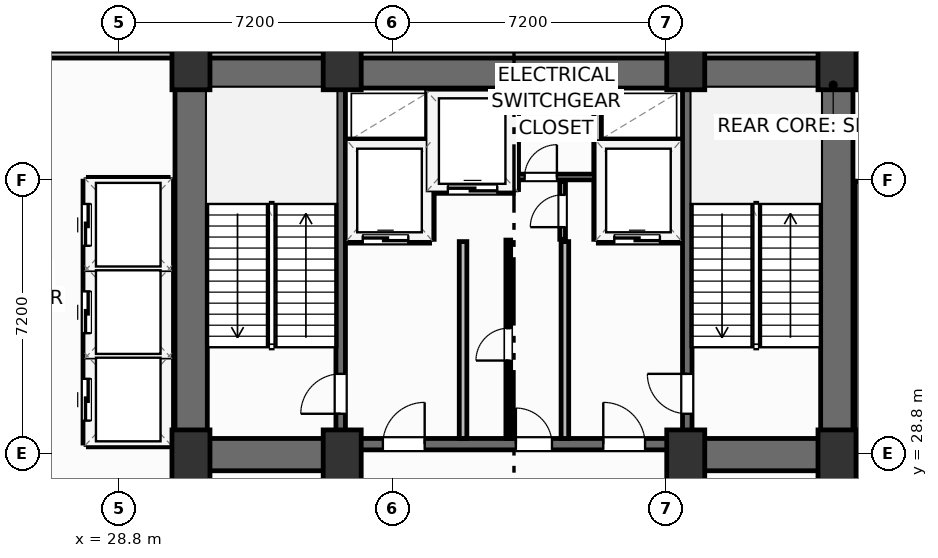
"""IFC4 building model, lengths in metres.
Left out: names, types, materials, properties, quantities, classifications, styles, units other than length and angle.
Written with IfcOpenShell. Run it as: python <this file> out.ifc"""

import sys

from ifc_helpers import new_model, si_unit, direction, frame, frame_2d, origin, origin_2d, place, context, subcontext, project, spatial, rectangle, extrude, element, fill, save


model = new_model("IFC4")
c1 = context("Model", 3, precision=1e-05, world=origin(), true_north=direction((0.0, 1.0)))
c2 = subcontext(c1, "Body", "Model", "MODEL_VIEW")
j1 = project(units=[si_unit("LENGTHUNIT", "METRE"), si_unit("PLANEANGLEUNIT", "RADIAN")], contexts=[c1])
p1 = place(None, origin())
s1 = spatial("IfcSite", under=j1, at=p1, CompositionType="ELEMENT")
p2 = place(p1, origin())
s2 = spatial("IfcBuilding", under=s1, at=p2, CompositionType="ELEMENT")
p3 = place(p2, frame((0.0, 0.0, 71.4)))
s3 = spatial("IfcBuildingStorey", under=s2, at=p3, CompositionType="ELEMENT", Elevation=71.4)
for number, where, z_axis, x_axis in (
    (1, (30.7, 28.75, 0.0), (0.0, 0.0, 1.0), (1.0, 0.0, 0.0)),
    (2, (34.68, 28.75, 0.0), (0.0, 0.0, 1.0), (1.0, 0.0, 0.0)),
    (3, (43.72, 28.75, 0.0), (0.0, 0.0, 1.0), (1.0, 0.0, 0.0)),
    (4, (47.7, 28.75, 0.0), (0.0, 0.0, 1.0), (1.0, 0.0, 0.0)),
    (5, (30.7, 39.05, 0.0), (0.0, 0.0, 1.0), (1.0, 0.0, 0.0)),
    (6, (34.68, 39.05, 0.0), (0.0, 0.0, 1.0), (1.0, 0.0, 0.0)),
    (7, (43.72, 39.05, 0.0), (0.0, 0.0, 1.0), (1.0, 0.0, 0.0)),
    (8, (47.7, 39.05, 0.0), (0.0, 0.0, 1.0), (1.0, 0.0, 0.0)),
):
    element("IfcColumn", number, at=place(p3, frame(where, z_axis=z_axis, x_axis=x_axis)), inside=s3, PredefinedType="COLUMN", context=c2, shape_type="SweptSolid", body=[
        extrude(rectangle(XDim=1.0, YDim=1.35, at=origin_2d()), origin(), (0.0, 0.0, 1.0), 4.8),
    ])
p4 = place(p3, frame((30.28, 38.845, 0.0), z_axis=(0.0, 0.0, 1.0), x_axis=(1.0, 0.0, 0.0)))
e9 = element("IfcWall", 9, at=p4, inside=s3, PredefinedType="SHEAR", context=c2, shape_type="SweptSolid", body=[
    extrude(rectangle(XDim=17.84, YDim=0.85, at=frame_2d((8.92, 0.0))), origin(), (0.0, 0.0, 1.0), 4.55),
])
for number, where, z_axis, x_axis in (
    (10, (30.705, 29.2, 0.0), (0.0, 0.0, 1.0), (0.0, 1.0, 0.0)),
    (11, (47.695, 29.2, 0.0), (0.0, 0.0, 1.0), (0.0, 1.0, 0.0)),
):
    element("IfcWall", number, at=place(p3, frame(where, z_axis=z_axis, x_axis=x_axis)), inside=s3, PredefinedType="SHEAR", context=c2, shape_type="SweptSolid", body=[
        extrude(rectangle(XDim=9.22, YDim=0.85, at=frame_2d((4.61, 0.0))), origin(), (0.0, 0.0, 1.0), 4.55),
    ])
for number, where, z_axis, x_axis in (
    (12, (30.28, 28.775, 0.0), (0.0, 0.0, 1.0), (1.0, 0.0, 0.0)),
    (13, (43.6, 28.775, 0.0), (0.0, 0.0, 1.0), (1.0, 0.0, 0.0)),
):
    element("IfcWall", number, at=place(p3, frame(where, z_axis=z_axis, x_axis=x_axis)), inside=s3, PredefinedType="SHEAR", context=c2, shape_type="SweptSolid", body=[
        extrude(rectangle(XDim=4.52, YDim=0.85, at=frame_2d((2.26, 0.0))), origin(), (0.0, 0.0, 1.0), 4.55),
    ])
p5 = place(p3, frame((34.8, 29.05, 0.0), z_axis=(0.0, 0.0, 1.0), x_axis=(1.0, 0.0, 0.0)))
e14 = element("IfcWall", 14, at=p5, inside=s3, PredefinedType="SHEAR", context=c2, shape_type="SweptSolid", body=[
    extrude(rectangle(XDim=8.8, YDim=0.3, at=frame_2d((4.4, 0.0))), origin(), (0.0, 0.0, 1.0), 4.55),
])
p6 = place(p5, frame((0.95, 0.0, 0.0)))
e15 = element("IfcOpeningElement", 15, at=p6, cuts=e14, PredefinedType="OPENING", context=c2, shape_type="SweptSolid", body=[
    extrude(rectangle(XDim=1.1, YDim=2.15, at=frame_2d((0.55, 1.075))), frame((0.0, 0.16, 0.0), z_axis=(0.0, -1.0, 0.0), x_axis=(1.0, 0.0, 0.0)), (0.0, 0.0, 1.0), 0.32),
])
p7 = place(p5, frame((6.75, 0.0, 0.0)))
e16 = element("IfcOpeningElement", 16, at=p7, cuts=e14, PredefinedType="OPENING", context=c2, shape_type="SweptSolid", body=[
    extrude(rectangle(XDim=1.1, YDim=2.15, at=frame_2d((0.55, 1.075))), frame((0.0, 0.16, 0.0), z_axis=(0.0, -1.0, 0.0), x_axis=(1.0, 0.0, 0.0)), (0.0, 0.0, 1.0), 0.32),
])
p8 = place(p5, frame((4.45, 0.0, 0.0)))
e17 = element("IfcOpeningElement", 17, at=p8, cuts=e14, PredefinedType="OPENING", context=c2, shape_type="SweptSolid", body=[
    extrude(rectangle(XDim=0.95, YDim=2.15, at=frame_2d((0.475, 1.075))), frame((0.0, 0.16, 0.0), z_axis=(0.0, -1.0, 0.0), x_axis=(1.0, 0.0, 0.0)), (0.0, 0.0, 1.0), 0.32),
])
p9 = place(p3, frame((34.64, 29.2, 0.0), z_axis=(0.0, 0.0, 1.0), x_axis=(0.0, 1.0, 0.0)))
e18 = element("IfcWall", 18, at=p9, inside=s3, PredefinedType="SHEAR", context=c2, shape_type="SweptSolid", body=[
    extrude(rectangle(XDim=9.22, YDim=0.25, at=frame_2d((4.61, 0.0))), origin(), (0.0, 0.0, 1.0), 4.55),
])
p10 = place(p9, frame((0.65, 0.0, 0.0)))
e19 = element("IfcOpeningElement", 19, at=p10, cuts=e18, PredefinedType="OPENING", context=c2, shape_type="SweptSolid", body=[
    extrude(rectangle(XDim=1.05, YDim=2.15, at=frame_2d((0.525, 1.075))), frame((0.0, 0.135, 0.0), z_axis=(0.0, -1.0, 0.0), x_axis=(1.0, 0.0, 0.0)), (0.0, 0.0, 1.0), 0.27),
])
p11 = place(p3, frame((43.76, 29.2, 0.0), z_axis=(0.0, 0.0, 1.0), x_axis=(0.0, 1.0, 0.0)))
e20 = element("IfcWall", 20, at=p11, inside=s3, PredefinedType="SHEAR", context=c2, shape_type="SweptSolid", body=[
    extrude(rectangle(XDim=9.22, YDim=0.25, at=frame_2d((4.61, 0.0))), origin(), (0.0, 0.0, 1.0), 4.55),
])
p12 = place(p11, frame((0.65, 0.0, 0.0)))
e21 = element("IfcOpeningElement", 21, at=p12, cuts=e20, PredefinedType="OPENING", context=c2, shape_type="SweptSolid", body=[
    extrude(rectangle(XDim=1.05, YDim=2.15, at=frame_2d((0.525, 1.075))), frame((0.0, 0.135, 0.0), z_axis=(0.0, -1.0, 0.0), x_axis=(1.0, 0.0, 0.0)), (0.0, 0.0, 1.0), 0.27),
])
p13 = place(p3, frame((18.646, 55.739, 0.0), z_axis=(0.0, 0.0, 1.0), x_axis=(0.935222250741, -0.354061211825, 0.0)))
e22 = element("IfcWall", 22, at=p13, inside=s3, PredefinedType="SOLIDWALL", context=c2, shape_type="SweptSolid", body=[
    extrude(rectangle(XDim=60.0, YDim=0.22, at=frame_2d((30.0, 0.0))), origin(), (0.0, 0.0, 1.0), 3.83),
])
p14 = place(p13, frame((27.647, 0.0, 0.0)))
e23 = element("IfcOpeningElement", 23, at=p14, cuts=e22, PredefinedType="OPENING", context=c2, shape_type="SweptSolid", body=[
    extrude(rectangle(XDim=1.85, YDim=2.3, at=frame_2d((0.925, 1.15))), frame((0.0, 0.12, 0.0), z_axis=(0.0, -1.0, 0.0), x_axis=(1.0, 0.0, 0.0)), (0.0, 0.0, 1.0), 0.24),
])
p15 = place(p13, frame((0.55, 0.0, 0.75)))
e24 = element("IfcOpeningElement", 24, at=p15, cuts=e22, PredefinedType="OPENING", context=c2, shape_type="SweptSolid", body=[
    extrude(rectangle(XDim=1.65, YDim=1.65, at=frame_2d((0.825, 0.825))), frame((0.0, 0.12, 0.0), z_axis=(0.0, -1.0, 0.0), x_axis=(1.0, 0.0, 0.0)), (0.0, 0.0, 1.0), 0.24),
])
p16 = place(p13, frame((57.8, 0.0, 0.75)))
e25 = element("IfcOpeningElement", 25, at=p16, cuts=e22, PredefinedType="OPENING", context=c2, shape_type="SweptSolid", body=[
    extrude(rectangle(XDim=1.65, YDim=1.65, at=frame_2d((0.825, 0.825))), frame((0.0, 0.12, 0.0), z_axis=(0.0, -1.0, 0.0), x_axis=(1.0, 0.0, 0.0)), (0.0, 0.0, 1.0), 0.24),
])
p17 = place(p3, frame((20.0, 39.3, 0.0), z_axis=(0.0, 0.0, 1.0), x_axis=(1.0, 0.0, 0.0)))
e26 = element("IfcWall", 26, at=p17, inside=s3, PredefinedType="PARTITIONING", context=c2, shape_type="SweptSolid", body=[
    extrude(rectangle(XDim=33.3, YDim=0.18, at=frame_2d((16.65, 0.0))), origin(), (0.0, 0.0, 1.0), 3.68),
])
p18 = place(p17, frame((31.1, 0.0, 0.0)))
e27 = element("IfcOpeningElement", 27, at=p18, cuts=e26, PredefinedType="OPENING", context=c2, shape_type="SweptSolid", body=[
    extrude(rectangle(XDim=1.0, YDim=2.05, at=frame_2d((0.5, 1.025))), frame((0.0, 0.1, 0.0), z_axis=(0.0, -1.0, 0.0), x_axis=(1.0, 0.0, 0.0)), (0.0, 0.0, 1.0), 0.2),
])
for number, where, z_axis, x_axis in (
    (28, (37.86, 29.2, 0.0), (0.0, 0.0, 1.0), (0.0, 1.0, 0.0)),
    (29, (40.54, 29.2, 0.0), (0.0, 0.0, 1.0), (0.0, 1.0, 0.0)),
):
    element("IfcWall", number, at=place(p3, frame(where, z_axis=z_axis, x_axis=x_axis)), inside=s3, PredefinedType="PARTITIONING", context=c2, shape_type="SweptSolid", body=[
        extrude(rectangle(XDim=5.18, YDim=0.2, at=frame_2d((2.59, 0.0))), origin(), (0.0, 0.0, 1.0), 4.55),
    ])
p19 = place(p3, frame((34.8, 34.44, 0.0), z_axis=(0.0, 0.0, 1.0), x_axis=(1.0, 0.0, 0.0)))
e30 = element("IfcWall", 30, at=p19, inside=s3, PredefinedType="PARTITIONING", context=c2, shape_type="SweptSolid", body=[
    extrude(rectangle(XDim=2.18, YDim=0.2, at=frame_2d((1.09, 0.0))), origin(), (0.0, 0.0, 1.0), 4.55),
])
p20 = place(p19, frame((0.42, 0.0, 0.0)))
e31 = element("IfcOpeningElement", 31, at=p20, cuts=e30, PredefinedType="OPENING", context=c2, shape_type="SweptSolid", body=[
    extrude(rectangle(XDim=1.2, YDim=2.2, at=frame_2d((0.6, 1.1))), frame((0.0, 0.11, 0.0), z_axis=(0.0, -1.0, 0.0), x_axis=(1.0, 0.0, 0.0)), (0.0, 0.0, 1.0), 0.22),
])
p21 = place(p3, frame((34.8, 36.98, 0.0), z_axis=(0.0, 0.0, 1.0), x_axis=(1.0, 0.0, 0.0)))
e32 = element("IfcWall", 32, at=p21, inside=s3, PredefinedType="PARTITIONING", context=c2, shape_type="SweptSolid", body=[
    extrude(rectangle(XDim=2.18, YDim=0.2, at=frame_2d((1.09, 0.0))), origin(), (0.0, 0.0, 1.0), 4.55),
])
p22 = place(p3, frame((37.0, 34.44, 0.0), z_axis=(0.0, 0.0, 1.0), x_axis=(0.0, 1.0, 0.0)))
e33 = element("IfcWall", 33, at=p22, inside=s3, PredefinedType="PARTITIONING", context=c2, shape_type="SweptSolid", body=[
    extrude(rectangle(XDim=3.9, YDim=0.2, at=frame_2d((1.95, 0.0))), origin(), (0.0, 0.0, 1.0), 4.55),
])
p23 = place(p3, frame((41.42, 34.44, 0.0), z_axis=(0.0, 0.0, 1.0), x_axis=(1.0, 0.0, 0.0)))
e34 = element("IfcWall", 34, at=p23, inside=s3, PredefinedType="PARTITIONING", context=c2, shape_type="SweptSolid", body=[
    extrude(rectangle(XDim=2.18, YDim=0.2, at=frame_2d((1.09, 0.0))), origin(), (0.0, 0.0, 1.0), 4.55),
])
p24 = place(p23, frame((0.42, 0.0, 0.0)))
e35 = element("IfcOpeningElement", 35, at=p24, cuts=e34, PredefinedType="OPENING", context=c2, shape_type="SweptSolid", body=[
    extrude(rectangle(XDim=1.2, YDim=2.2, at=frame_2d((0.6, 1.1))), frame((0.0, 0.11, 0.0), z_axis=(0.0, -1.0, 0.0), x_axis=(1.0, 0.0, 0.0)), (0.0, 0.0, 1.0), 0.22),
])
p25 = place(p3, frame((41.42, 36.98, 0.0), z_axis=(0.0, 0.0, 1.0), x_axis=(1.0, 0.0, 0.0)))
e36 = element("IfcWall", 36, at=p25, inside=s3, PredefinedType="PARTITIONING", context=c2, shape_type="SweptSolid", body=[
    extrude(rectangle(XDim=2.18, YDim=0.2, at=frame_2d((1.09, 0.0))), origin(), (0.0, 0.0, 1.0), 4.55),
])
p26 = place(p3, frame((41.4, 34.44, 0.0), z_axis=(0.0, 0.0, 1.0), x_axis=(0.0, 1.0, 0.0)))
e37 = element("IfcWall", 37, at=p26, inside=s3, PredefinedType="PARTITIONING", context=c2, shape_type="SweptSolid", body=[
    extrude(rectangle(XDim=3.9, YDim=0.2, at=frame_2d((1.95, 0.0))), origin(), (0.0, 0.0, 1.0), 4.55),
])
p27 = place(p3, frame((37.06, 35.75, 0.0), z_axis=(0.0, 0.0, 1.0), x_axis=(1.0, 0.0, 0.0)))
e38 = element("IfcWall", 38, at=p27, inside=s3, PredefinedType="PARTITIONING", context=c2, shape_type="SweptSolid", body=[
    extrude(rectangle(XDim=2.12, YDim=0.2, at=frame_2d((1.06, 0.0))), origin(), (0.0, 0.0, 1.0), 4.55),
])
p28 = place(p27, frame((0.4, 0.0, 0.0)))
e39 = element("IfcOpeningElement", 39, at=p28, cuts=e38, PredefinedType="OPENING", context=c2, shape_type="SweptSolid", body=[
    extrude(rectangle(XDim=1.3, YDim=2.2, at=frame_2d((0.65, 1.1))), frame((0.0, 0.11, 0.0), z_axis=(0.0, -1.0, 0.0), x_axis=(1.0, 0.0, 0.0)), (0.0, 0.0, 1.0), 0.22),
])
p29 = place(p3, frame((39.22, 35.75, 0.0), z_axis=(0.0, 0.0, 1.0), x_axis=(0.0, 1.0, 0.0)))
e40 = element("IfcWall", 40, at=p29, inside=s3, PredefinedType="PARTITIONING", context=c2, shape_type="SweptSolid", body=[
    extrude(rectangle(XDim=2.59, YDim=0.2, at=frame_2d((1.295, 0.0))), origin(), (0.0, 0.0, 1.0), 4.55),
])
p30 = place(p3, frame((39.3, 36.08, 0.0), z_axis=(0.0, 0.0, 1.0), x_axis=(1.0, 0.0, 0.0)))
e41 = element("IfcWall", 41, at=p30, inside=s3, PredefinedType="PARTITIONING", context=c2, shape_type="SweptSolid", body=[
    extrude(rectangle(XDim=2.02, YDim=0.15, at=frame_2d((1.01, 0.0))), origin(), (0.0, 0.0, 1.0), 4.55),
])
p31 = place(p30, frame((0.18, 0.0, 0.0)))
e42 = element("IfcOpeningElement", 42, at=p31, cuts=e41, PredefinedType="OPENING", context=c2, shape_type="SweptSolid", body=[
    extrude(rectangle(XDim=0.85, YDim=2.05, at=frame_2d((0.425, 1.025))), frame((0.0, 0.085, 0.0), z_axis=(0.0, -1.0, 0.0), x_axis=(1.0, 0.0, 0.0)), (0.0, 0.0, 1.0), 0.17),
])
p32 = place(p3, frame((40.48, 34.44, 0.0), z_axis=(0.0, 0.0, 1.0), x_axis=(0.0, 1.0, 0.0)))
e43 = element("IfcWall", 43, at=p32, inside=s3, PredefinedType="PARTITIONING", context=c2, shape_type="SweptSolid", body=[
    extrude(rectangle(XDim=1.52, YDim=0.15, at=frame_2d((0.76, 0.0))), origin(), (0.0, 0.0, 1.0), 4.55),
])
p33 = place(p32, frame((0.32, 0.0, 0.0)))
e44 = element("IfcOpeningElement", 44, at=p33, cuts=e43, PredefinedType="OPENING", context=c2, shape_type="SweptSolid", body=[
    extrude(rectangle(XDim=0.85, YDim=2.05, at=frame_2d((0.425, 1.025))), frame((0.0, 0.085, 0.0), z_axis=(0.0, -1.0, 0.0), x_axis=(1.0, 0.0, 0.0)), (0.0, 0.0, 1.0), 0.17),
])
p34 = place(p3, frame((39.05, 29.2, 0.0), z_axis=(0.0, 0.0, 1.0), x_axis=(0.0, 1.0, 0.0)))
e45 = element("IfcWall", 45, at=p34, inside=s3, PredefinedType="PARTITIONING", context=c2, shape_type="SweptSolid", body=[
    extrude(rectangle(XDim=5.22, YDim=0.125, at=frame_2d((2.61, 0.0))), origin(), (0.0, 0.0, 1.0), 4.55),
])
p35 = place(p34, frame((2.05, 0.0, 0.0)))
e46 = element("IfcOpeningElement", 46, at=p35, cuts=e45, PredefinedType="OPENING", context=c2, shape_type="SweptSolid", body=[
    extrude(rectangle(XDim=0.85, YDim=2.05, at=frame_2d((0.425, 1.025))), frame((0.0, 0.073, 0.0), z_axis=(0.0, -1.0, 0.0), x_axis=(1.0, 0.0, 0.0)), (0.0, 0.0, 1.0), 0.145),
])
for number, where, z_axis, x_axis in (
    (47, (28.02, 31.375, 0.0), (0.0, 0.0, 1.0), (1.0, 0.0, 0.0)),
    (48, (28.02, 33.675, 0.0), (0.0, 0.0, 1.0), (1.0, 0.0, 0.0)),
):
    element("IfcWall", number, at=place(p3, frame(where, z_axis=z_axis, x_axis=x_axis)), inside=s3, PredefinedType="PARTITIONING", context=c2, shape_type="SweptSolid", body=[
        extrude(rectangle(XDim=2.06, YDim=0.2, at=frame_2d((1.03, 0.0))), origin(), (0.0, 0.0, 1.0), 4.55),
    ])
for number, where, z_axis, x_axis in (
    (49, (28.0, 29.08, 0.0), (0.0, 0.0, 1.0), (1.0, 0.0, 0.0)),
    (50, (28.0, 35.97, 0.0), (0.0, 0.0, 1.0), (1.0, 0.0, 0.0)),
):
    element("IfcWall", number, at=place(p3, frame(where, z_axis=z_axis, x_axis=x_axis)), inside=s3, PredefinedType="PARTITIONING", context=c2, shape_type="SweptSolid", body=[
        extrude(rectangle(XDim=2.1, YDim=0.2, at=frame_2d((1.05, 0.0))), origin(), (0.0, 0.0, 1.0), 4.55),
    ])
p36 = place(p3, frame((30.12, 29.08, 0.0), z_axis=(0.0, 0.0, 1.0), x_axis=(0.0, 1.0, 0.0)))
e51 = element("IfcWall", 51, at=p36, inside=s3, PredefinedType="PARTITIONING", context=c2, shape_type="SweptSolid", body=[
    extrude(rectangle(XDim=6.89, YDim=0.2, at=frame_2d((3.445, 0.0))), origin(), (0.0, 0.0, 1.0), 4.55),
])
p37 = place(p3, frame((27.96, 29.08, 0.0), z_axis=(0.0, 0.0, 1.0), x_axis=(0.0, 1.0, 0.0)))
e52 = element("IfcWall", 52, at=p37, inside=s3, PredefinedType="PARTITIONING", context=c2, shape_type="SweptSolid", body=[
    extrude(rectangle(XDim=6.89, YDim=0.2, at=frame_2d((3.445, 0.0))), origin(), (0.0, 0.0, 1.0), 4.55),
])
p38 = place(p37, frame((0.59, 0.0, 0.0)))
e53 = element("IfcOpeningElement", 53, at=p38, cuts=e52, PredefinedType="OPENING", context=c2, shape_type="SweptSolid", body=[
    extrude(rectangle(XDim=1.1, YDim=2.15, at=frame_2d((0.55, 1.075))), frame((0.0, 0.11, 0.0), z_axis=(0.0, -1.0, 0.0), x_axis=(1.0, 0.0, 0.0)), (0.0, 0.0, 1.0), 0.22),
])
p39 = place(p37, frame((2.89, 0.0, 0.0)))
e54 = element("IfcOpeningElement", 54, at=p39, cuts=e52, PredefinedType="OPENING", context=c2, shape_type="SweptSolid", body=[
    extrude(rectangle(XDim=1.1, YDim=2.15, at=frame_2d((0.55, 1.075))), frame((0.0, 0.11, 0.0), z_axis=(0.0, -1.0, 0.0), x_axis=(1.0, 0.0, 0.0)), (0.0, 0.0, 1.0), 0.22),
])
p40 = place(p37, frame((5.19, 0.0, 0.0)))
e55 = element("IfcOpeningElement", 55, at=p40, cuts=e52, PredefinedType="OPENING", context=c2, shape_type="SweptSolid", body=[
    extrude(rectangle(XDim=1.1, YDim=2.15, at=frame_2d((0.55, 1.075))), frame((0.0, 0.11, 0.0), z_axis=(0.0, -1.0, 0.0), x_axis=(1.0, 0.0, 0.0)), (0.0, 0.0, 1.0), 0.22),
])
p41 = place(p3, frame((48.28, 29.08, 0.0), z_axis=(0.0, 0.0, 1.0), x_axis=(0.0, 1.0, 0.0)))
e56 = element("IfcWall", 56, at=p41, inside=s3, PredefinedType="PARTITIONING", context=c2, shape_type="SweptSolid", body=[
    extrude(rectangle(XDim=6.89, YDim=0.2, at=frame_2d((3.445, 0.0))), origin(), (0.0, 0.0, 1.0), 4.55),
])
p42 = place(p10, origin())
e57 = element("IfcDoor", 57, at=p42, inside=s3, OperationType="SINGLE_SWING_LEFT", PredefinedType="DOOR", context=c2, shape_type="SweptSolid", body=[
    extrude(rectangle(XDim=1.05, YDim=2.15, at=frame_2d((0.525, 1.075))), frame((0.0, 0.025, 0.0), z_axis=(0.0, -1.0, 0.0), x_axis=(1.0, 0.0, 0.0)), (0.0, 0.0, 1.0), 0.05),
])
fill(e19, e57)
p43 = place(p12, origin())
e58 = element("IfcDoor", 58, at=p43, inside=s3, OperationType="SINGLE_SWING_RIGHT", PredefinedType="DOOR", context=c2, shape_type="SweptSolid", body=[
    extrude(rectangle(XDim=1.05, YDim=2.15, at=frame_2d((0.525, 1.075))), frame((0.0, 0.025, 0.0), z_axis=(0.0, -1.0, 0.0), x_axis=(1.0, 0.0, 0.0)), (0.0, 0.0, 1.0), 0.05),
])
fill(e21, e58)
p44 = place(p6, origin())
e59 = element("IfcDoor", 59, at=p44, inside=s3, OperationType="SINGLE_SWING_RIGHT", PredefinedType="DOOR", context=c2, shape_type="SweptSolid", body=[
    extrude(rectangle(XDim=1.1, YDim=2.15, at=frame_2d((0.55, 1.075))), frame((0.0, 0.025, 0.0), z_axis=(0.0, -1.0, 0.0), x_axis=(1.0, 0.0, 0.0)), (0.0, 0.0, 1.0), 0.05),
])
fill(e15, e59)
p45 = place(p7, origin())
e60 = element("IfcDoor", 60, at=p45, inside=s3, OperationType="SINGLE_SWING_LEFT", PredefinedType="DOOR", context=c2, shape_type="SweptSolid", body=[
    extrude(rectangle(XDim=1.1, YDim=2.15, at=frame_2d((0.55, 1.075))), frame((0.0, 0.025, 0.0), z_axis=(0.0, -1.0, 0.0), x_axis=(1.0, 0.0, 0.0)), (0.0, 0.0, 1.0), 0.05),
])
fill(e16, e60)
p46 = place(p20, origin())
e61 = element("IfcDoor", 61, at=p46, inside=s3, OperationType="SLIDING_TO_LEFT", PredefinedType="DOOR", context=c2, shape_type="SweptSolid", body=[
    extrude(rectangle(XDim=1.2, YDim=2.2, at=frame_2d((0.6, 1.1))), frame((0.0, 0.025, 0.0), z_axis=(0.0, -1.0, 0.0), x_axis=(1.0, 0.0, 0.0)), (0.0, 0.0, 1.0), 0.05),
])
fill(e31, e61)
p47 = place(p24, origin())
e62 = element("IfcDoor", 62, at=p47, inside=s3, OperationType="SLIDING_TO_LEFT", PredefinedType="DOOR", context=c2, shape_type="SweptSolid", body=[
    extrude(rectangle(XDim=1.2, YDim=2.2, at=frame_2d((0.6, 1.1))), frame((0.0, 0.025, 0.0), z_axis=(0.0, -1.0, 0.0), x_axis=(1.0, 0.0, 0.0)), (0.0, 0.0, 1.0), 0.05),
])
fill(e35, e62)
p48 = place(p28, origin())
e63 = element("IfcDoor", 63, at=p48, inside=s3, OperationType="SLIDING_TO_LEFT", PredefinedType="DOOR", context=c2, shape_type="SweptSolid", body=[
    extrude(rectangle(XDim=1.3, YDim=2.2, at=frame_2d((0.65, 1.1))), frame((0.0, 0.025, 0.0), z_axis=(0.0, -1.0, 0.0), x_axis=(1.0, 0.0, 0.0)), (0.0, 0.0, 1.0), 0.05),
])
fill(e39, e63)
p49 = place(p31, origin())
e64 = element("IfcDoor", 64, at=p49, inside=s3, OperationType="SINGLE_SWING_RIGHT", PredefinedType="DOOR", context=c2, shape_type="SweptSolid", body=[
    extrude(rectangle(XDim=0.85, YDim=2.05, at=frame_2d((0.425, 1.025))), frame((0.0, 0.025, 0.0), z_axis=(0.0, -1.0, 0.0), x_axis=(1.0, 0.0, 0.0)), (0.0, 0.0, 1.0), 0.05),
])
fill(e42, e64)
p50 = place(p33, origin())
e65 = element("IfcDoor", 65, at=p50, inside=s3, OperationType="SINGLE_SWING_LEFT", PredefinedType="DOOR", context=c2, shape_type="SweptSolid", body=[
    extrude(rectangle(XDim=0.85, YDim=2.05, at=frame_2d((0.425, 1.025))), frame((0.0, 0.025, 0.0), z_axis=(0.0, -1.0, 0.0), x_axis=(1.0, 0.0, 0.0)), (0.0, 0.0, 1.0), 0.05),
])
fill(e44, e65)
p51 = place(p35, origin())
e66 = element("IfcDoor", 66, at=p51, inside=s3, OperationType="SINGLE_SWING_LEFT", PredefinedType="DOOR", context=c2, shape_type="SweptSolid", body=[
    extrude(rectangle(XDim=0.85, YDim=2.05, at=frame_2d((0.425, 1.025))), frame((0.0, 0.025, 0.0), z_axis=(0.0, -1.0, 0.0), x_axis=(1.0, 0.0, 0.0)), (0.0, 0.0, 1.0), 0.05),
])
fill(e46, e66)
p52 = place(p8, origin())
e67 = element("IfcDoor", 67, at=p52, inside=s3, OperationType="SINGLE_SWING_LEFT", PredefinedType="DOOR", context=c2, shape_type="SweptSolid", body=[
    extrude(rectangle(XDim=0.95, YDim=2.15, at=frame_2d((0.475, 1.075))), frame((0.0, 0.025, 0.0), z_axis=(0.0, -1.0, 0.0), x_axis=(1.0, 0.0, 0.0)), (0.0, 0.0, 1.0), 0.05),
])
fill(e17, e67)
p53 = place(p38, origin())
e68 = element("IfcDoor", 68, at=p53, inside=s3, OperationType="SLIDING_TO_LEFT", PredefinedType="DOOR", context=c2, shape_type="SweptSolid", body=[
    extrude(rectangle(XDim=1.1, YDim=2.15, at=frame_2d((0.55, 1.075))), frame((0.0, 0.025, 0.0), z_axis=(0.0, -1.0, 0.0), x_axis=(1.0, 0.0, 0.0)), (0.0, 0.0, 1.0), 0.05),
])
fill(e53, e68)
p54 = place(p39, origin())
e69 = element("IfcDoor", 69, at=p54, inside=s3, OperationType="SLIDING_TO_LEFT", PredefinedType="DOOR", context=c2, shape_type="SweptSolid", body=[
    extrude(rectangle(XDim=1.1, YDim=2.15, at=frame_2d((0.55, 1.075))), frame((0.0, 0.025, 0.0), z_axis=(0.0, -1.0, 0.0), x_axis=(1.0, 0.0, 0.0)), (0.0, 0.0, 1.0), 0.05),
])
fill(e54, e69)
p55 = place(p40, origin())
e70 = element("IfcDoor", 70, at=p55, inside=s3, OperationType="SLIDING_TO_LEFT", PredefinedType="DOOR", context=c2, shape_type="SweptSolid", body=[
    extrude(rectangle(XDim=1.1, YDim=2.15, at=frame_2d((0.55, 1.075))), frame((0.0, 0.025, 0.0), z_axis=(0.0, -1.0, 0.0), x_axis=(1.0, 0.0, 0.0)), (0.0, 0.0, 1.0), 0.05),
])
fill(e55, e70)
save(model, sys.argv[1])
